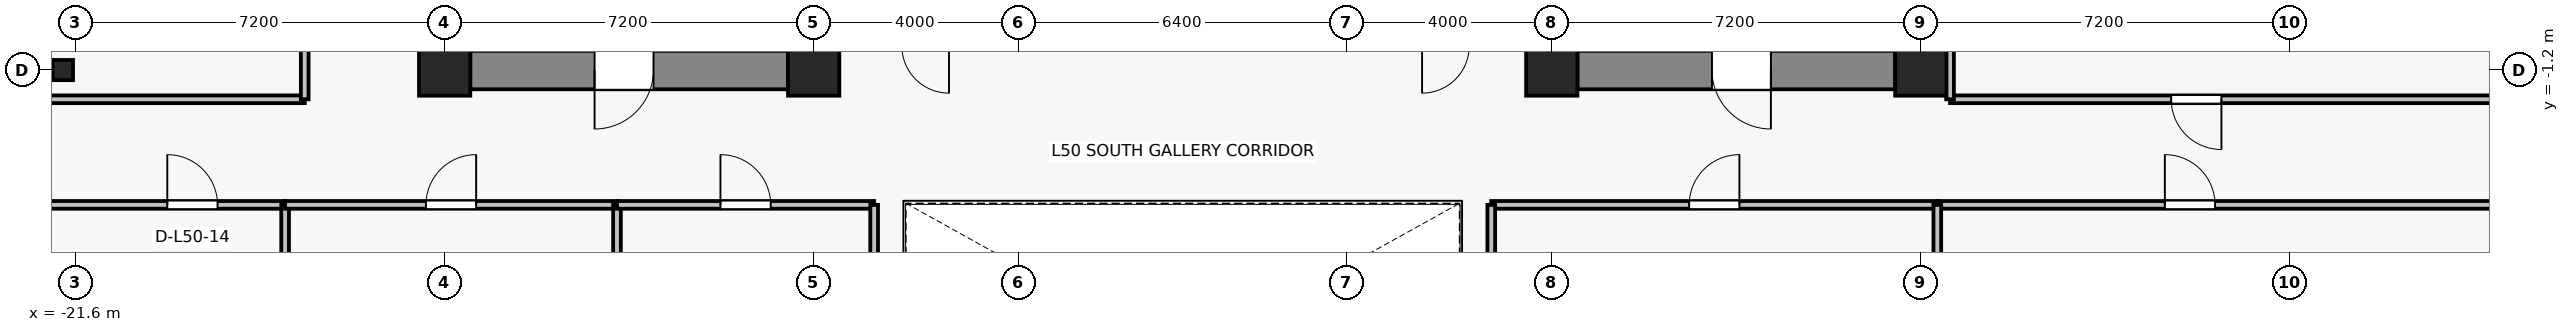
"""IFC4 building model, lengths in metres.
Left out: names, types, materials, properties, quantities, classifications, styles, units other than length and angle.
Written with IfcOpenShell. Run it as: python <this file> out.ifc"""

import sys

from ifc_helpers import new_model, si_unit, direction, frame, frame_2d, origin, origin_2d, place, context, subcontext, project, spatial, rectangle, i_section, extrude, source, transform, mapped, element, fill, save


model = new_model("IFC4")
c1 = context("Model", 3, precision=1e-05, world=origin(), true_north=direction((0.0, 1.0)))
c2 = subcontext(c1, "Body", "Model", "MODEL_VIEW")
j1 = project(units=[si_unit("LENGTHUNIT", "METRE"), si_unit("PLANEANGLEUNIT", "RADIAN")], contexts=[c1])
p1 = place(None, origin())
s1 = spatial("IfcSite", under=j1, at=p1, CompositionType="ELEMENT")
p2 = place(p1, origin())
s2 = spatial("IfcBuilding", under=s1, at=p2, CompositionType="ELEMENT")
p3 = place(p2, frame((0.0, 0.0, 179.2)))
s3 = spatial("IfcBuildingStorey", under=s2, at=p3, CompositionType="ELEMENT", Elevation=179.2)
for number, where, z_axis, x_axis in (
    (1, (-14.4, -1.2, 0.0), (0.0, 0.0, 1.0), (1.0, 0.0, 0.0)),
    (2, (-7.2, -1.2, 0.0), (0.0, 0.0, 1.0), (1.0, 0.0, 0.0)),
    (3, (7.2, -1.2, 0.0), (0.0, 0.0, 1.0), (1.0, 0.0, 0.0)),
    (4, (14.4, -1.2, 0.0), (0.0, 0.0, 1.0), (1.0, 0.0, 0.0)),
):
    element("IfcColumn", number, at=place(p3, frame(where, z_axis=z_axis, x_axis=x_axis)), inside=s3, PredefinedType="COLUMN", context=c2, shape_type="SweptSolid", body=[
        extrude(rectangle(XDim=1.0, YDim=1.0, at=origin_2d()), origin(), (0.0, 0.0, 1.0), 3.3),
    ])
p4 = place(p3, frame((-21.85, -1.2, 0.0), z_axis=(0.0, 0.0, 1.0), x_axis=(1.0, 0.0, 0.0)))
e5 = element("IfcColumn", 5, at=p4, inside=s3, PredefinedType="COLUMN", context=c2, shape_type="SweptSolid", body=[
    extrude(i_section(OverallWidth=0.399, OverallDepth=0.394, WebThickness=0.023, FlangeThickness=0.037, FilletRadius=0.015, at=origin_2d()), origin(), (0.0, 0.0, 1.0), 3.3),
])
p5 = place(p3, frame((-7.7, -1.2, 0.0), z_axis=(0.0, 0.0, 1.0), x_axis=(-1.0, 0.0, 0.0)))
e6 = element("IfcWall", 6, at=p5, inside=s3, PredefinedType="SHEAR", context=c2, shape_type="SweptSolid", body=[
    extrude(rectangle(XDim=6.2, YDim=0.75, at=frame_2d((3.1, 0.0))), origin(), (0.0, 0.0, 1.0), 3.075),
])
p6 = place(p5, frame((2.625, 0.0, 0.0)))
e7 = element("IfcOpeningElement", 7, at=p6, cuts=e6, PredefinedType="OPENING", context=c2, shape_type="SweptSolid", body=[
    extrude(rectangle(XDim=1.15, YDim=2.15, at=frame_2d((0.575, 1.075))), frame((0.0, 0.385, 0.0), z_axis=(0.0, -1.0, 0.0), x_axis=(1.0, 0.0, 0.0)), (0.0, 0.0, 1.0), 0.77),
])
p7 = place(p3, frame((13.9, -1.2, 0.0), z_axis=(0.0, 0.0, 1.0), x_axis=(-1.0, 0.0, 0.0)))
e8 = element("IfcWall", 8, at=p7, inside=s3, PredefinedType="SHEAR", context=c2, shape_type="SweptSolid", body=[
    extrude(rectangle(XDim=6.2, YDim=0.75, at=frame_2d((3.1, 0.0))), origin(), (0.0, 0.0, 1.0), 3.075),
])
p8 = place(p7, frame((2.425, 0.0, 0.0)))
e9 = element("IfcOpeningElement", 9, at=p8, cuts=e8, PredefinedType="OPENING", context=c2, shape_type="SweptSolid", body=[
    extrude(rectangle(XDim=1.15, YDim=2.15, at=frame_2d((0.575, 1.075))), frame((0.0, 0.385, 0.0), z_axis=(0.0, -1.0, 0.0), x_axis=(1.0, 0.0, 0.0)), (0.0, 0.0, 1.0), 0.77),
])
p9 = place(p3, frame((-22.53, -3.83, 0.0), z_axis=(0.0, 0.0, 1.0), x_axis=(1.0, 0.0, 0.0)))
e10 = element("IfcWall", 10, at=p9, inside=s3, PredefinedType="PARTITIONING", context=c2, shape_type="SweptSolid", body=[
    extrude(rectangle(XDim=5.018, YDim=0.15, at=frame_2d((2.509, 0.0))), origin(), (0.0, 0.0, 1.0), 2.565),
])
p10 = place(p9, frame((2.719, 0.0, 0.0)))
e11 = element("IfcOpeningElement", 11, at=p10, cuts=e10, PredefinedType="OPENING", context=c2, shape_type="SweptSolid", body=[
    extrude(rectangle(XDim=0.98, YDim=2.15, at=frame_2d((0.49, 1.075))), frame((0.0, 0.085, 0.0), z_axis=(0.0, -1.0, 0.0), x_axis=(1.0, 0.0, 0.0)), (0.0, 0.0, 1.0), 0.17),
])
p11 = place(p3, frame((-17.512, -3.83, 0.0), z_axis=(0.0, 0.0, 1.0), x_axis=(0.0, -1.0, 0.0)))
e12 = element("IfcWall", 12, at=p11, inside=s3, PredefinedType="PARTITIONING", context=c2, shape_type="SweptSolid", body=[
    extrude(rectangle(XDim=13.5, YDim=0.15, at=frame_2d((6.75, 0.0))), origin(), (0.0, 0.0, 1.0), 2.565),
])
p12 = place(p3, frame((-17.512, -3.83, 0.0), z_axis=(0.0, 0.0, 1.0), x_axis=(1.0, 0.0, 0.0)))
e13 = element("IfcWall", 13, at=p12, inside=s3, PredefinedType="PARTITIONING", context=c2, shape_type="SweptSolid", body=[
    extrude(rectangle(XDim=6.475, YDim=0.15, at=frame_2d((3.237, 0.0))), origin(), (0.0, 0.0, 1.0), 2.565),
])
p13 = place(p12, frame((2.747, 0.0, 0.0)))
e14 = element("IfcOpeningElement", 14, at=p13, cuts=e13, PredefinedType="OPENING", context=c2, shape_type="SweptSolid", body=[
    extrude(rectangle(XDim=0.98, YDim=2.15, at=frame_2d((0.49, 1.075))), frame((0.0, 0.085, 0.0), z_axis=(0.0, -1.0, 0.0), x_axis=(1.0, 0.0, 0.0)), (0.0, 0.0, 1.0), 0.17),
])
p14 = place(p3, frame((-11.038, -3.83, 0.0), z_axis=(0.0, 0.0, 1.0), x_axis=(0.0, -1.0, 0.0)))
e15 = element("IfcWall", 15, at=p14, inside=s3, PredefinedType="PARTITIONING", context=c2, shape_type="SweptSolid", body=[
    extrude(rectangle(XDim=13.5, YDim=0.15, at=frame_2d((6.75, 0.0))), origin(), (0.0, 0.0, 1.0), 2.565),
])
p15 = place(p3, frame((-11.038, -3.83, 0.0), z_axis=(0.0, 0.0, 1.0), x_axis=(1.0, 0.0, 0.0)))
e16 = element("IfcWall", 16, at=p15, inside=s3, PredefinedType="PARTITIONING", context=c2, shape_type="SweptSolid", body=[
    extrude(rectangle(XDim=5.018, YDim=0.15, at=frame_2d((2.509, 0.0))), origin(), (0.0, 0.0, 1.0), 2.565),
])
p16 = place(p15, frame((2.019, 0.0, 0.0)))
e17 = element("IfcOpeningElement", 17, at=p16, cuts=e16, PredefinedType="OPENING", context=c2, shape_type="SweptSolid", body=[
    extrude(rectangle(XDim=0.98, YDim=2.15, at=frame_2d((0.49, 1.075))), frame((0.0, 0.085, 0.0), z_axis=(0.0, -1.0, 0.0), x_axis=(1.0, 0.0, 0.0)), (0.0, 0.0, 1.0), 0.17),
])
p17 = place(p3, frame((-6.02, -3.83, 0.0), z_axis=(0.0, 0.0, 1.0), x_axis=(0.0, -1.0, 0.0)))
e18 = element("IfcWall", 18, at=p17, inside=s3, PredefinedType="PARTITIONING", context=c2, shape_type="SweptSolid", body=[
    extrude(rectangle(XDim=13.5, YDim=0.15, at=frame_2d((6.75, 0.0))), origin(), (0.0, 0.0, 1.0), 2.565),
])
p18 = place(p3, frame((6.02, -3.83, 0.0), z_axis=(0.0, 0.0, 1.0), x_axis=(1.0, 0.0, 0.0)))
e19 = element("IfcWall", 19, at=p18, inside=s3, PredefinedType="PARTITIONING", context=c2, shape_type="SweptSolid", body=[
    extrude(rectangle(XDim=8.702, YDim=0.15, at=frame_2d((4.351, 0.0))), origin(), (0.0, 0.0, 1.0), 2.565),
])
p19 = place(p18, frame((3.861, 0.0, 0.0)))
e20 = element("IfcOpeningElement", 20, at=p19, cuts=e19, PredefinedType="OPENING", context=c2, shape_type="SweptSolid", body=[
    extrude(rectangle(XDim=0.98, YDim=2.15, at=frame_2d((0.49, 1.075))), frame((0.0, 0.085, 0.0), z_axis=(0.0, -1.0, 0.0), x_axis=(1.0, 0.0, 0.0)), (0.0, 0.0, 1.0), 0.17),
])
p20 = place(p3, frame((6.02, -17.33, 0.0), z_axis=(0.0, 0.0, 1.0), x_axis=(0.0, 1.0, 0.0)))
e21 = element("IfcWall", 21, at=p20, inside=s3, PredefinedType="PARTITIONING", context=c2, shape_type="SweptSolid", body=[
    extrude(rectangle(XDim=13.5, YDim=0.15, at=frame_2d((6.75, 0.0))), origin(), (0.0, 0.0, 1.0), 2.565),
])
p21 = place(p3, frame((14.722, -3.83, 0.0), z_axis=(0.0, 0.0, 1.0), x_axis=(1.0, 0.0, 0.0)))
e22 = element("IfcWall", 22, at=p21, inside=s3, PredefinedType="PARTITIONING", context=c2, shape_type="SweptSolid", body=[
    extrude(rectangle(XDim=11.808, YDim=0.15, at=frame_2d((5.904, 0.0))), origin(), (0.0, 0.0, 1.0), 2.565),
])
p22 = place(p21, frame((4.439, 0.0, 0.0)))
e23 = element("IfcOpeningElement", 23, at=p22, cuts=e22, PredefinedType="OPENING", context=c2, shape_type="SweptSolid", body=[
    extrude(rectangle(XDim=0.98, YDim=2.15, at=frame_2d((0.49, 1.075))), frame((0.0, 0.085, 0.0), z_axis=(0.0, -1.0, 0.0), x_axis=(1.0, 0.0, 0.0)), (0.0, 0.0, 1.0), 0.17),
])
p23 = place(p3, frame((14.722, -9.18, 0.0), z_axis=(0.0, 0.0, 1.0), x_axis=(0.0, 1.0, 0.0)))
e24 = element("IfcWall", 24, at=p23, inside=s3, PredefinedType="PARTITIONING", context=c2, shape_type="SweptSolid", body=[
    extrude(rectangle(XDim=5.35, YDim=0.15, at=frame_2d((2.675, 0.0))), origin(), (0.0, 0.0, 1.0), 2.665),
])
p24 = place(p3, frame((-17.13, -1.77, 0.0), z_axis=(0.0, 0.0, 1.0), x_axis=(-1.0, 0.0, 0.0)))
e25 = element("IfcWall", 25, at=p24, inside=s3, PredefinedType="PARTITIONING", context=c2, shape_type="SweptSolid", body=[
    extrude(rectangle(XDim=5.4, YDim=0.15, at=frame_2d((2.7, 0.0))), origin(), (0.0, 0.0, 1.0), 2.565),
])
p25 = place(p3, frame((-17.13, 3.298, 0.0), z_axis=(0.0, 0.0, 1.0), x_axis=(0.0, -1.0, 0.0)))
e26 = element("IfcWall", 26, at=p25, inside=s3, PredefinedType="PARTITIONING", context=c2, shape_type="SweptSolid", body=[
    extrude(rectangle(XDim=5.068, YDim=0.15, at=frame_2d((2.534, 0.0))), origin(), (0.0, 0.0, 1.0), 2.565),
])
p26 = place(p25, frame((2.044, 0.0, 0.0)))
e27 = element("IfcOpeningElement", 27, at=p26, cuts=e26, PredefinedType="OPENING", context=c2, shape_type="SweptSolid", body=[
    extrude(rectangle(XDim=0.98, YDim=2.15, at=frame_2d((0.49, 1.075))), frame((0.0, 0.085, 0.0), z_axis=(0.0, -1.0, 0.0), x_axis=(1.0, 0.0, 0.0)), (0.0, 0.0, 1.0), 0.17),
])
p27 = place(p3, frame((26.53, -1.77, 0.0), z_axis=(0.0, 0.0, 1.0), x_axis=(-1.0, 0.0, 0.0)))
e28 = element("IfcWall", 28, at=p27, inside=s3, PredefinedType="PARTITIONING", context=c2, shape_type="SweptSolid", body=[
    extrude(rectangle(XDim=11.56, YDim=0.15, at=frame_2d((5.78, 0.0))), origin(), (0.0, 0.0, 1.0), 2.565),
])
p28 = place(p27, frame((6.265, 0.0, 0.0)))
e29 = element("IfcOpeningElement", 29, at=p28, cuts=e28, PredefinedType="OPENING", context=c2, shape_type="SweptSolid", body=[
    extrude(rectangle(XDim=0.98, YDim=2.15, at=frame_2d((0.49, 1.075))), frame((0.0, 0.085, 0.0), z_axis=(0.0, -1.0, 0.0), x_axis=(1.0, 0.0, 0.0)), (0.0, 0.0, 1.0), 0.17),
])
p29 = place(p3, frame((14.97, -1.77, 0.0), z_axis=(0.0, 0.0, 1.0), x_axis=(0.0, 1.0, 0.0)))
e30 = element("IfcWall", 30, at=p29, inside=s3, PredefinedType="PARTITIONING", context=c2, shape_type="SweptSolid", body=[
    extrude(rectangle(XDim=1.07, YDim=0.15, at=frame_2d((0.535, 0.0))), origin(), (0.0, 0.0, 1.0), 2.565),
])
m1 = source(origin(), c2, "Body", "SweptSolid", [
    extrude(rectangle(XDim=1.15, YDim=2.15, at=frame_2d((0.575, 1.075))), frame((0.0, 0.025, 0.0), z_axis=(0.0, -1.0, 0.0), x_axis=(1.0, 0.0, 0.0)), (0.0, 0.0, 1.0), 0.05),
])
p30 = place(p6, origin())
e31 = element("IfcDoor", 31, at=p30, inside=s3, OperationType="SINGLE_SWING_RIGHT", PredefinedType="DOOR", context=c2, shape_type="MappedRepresentation", body=[
    mapped(m1, transform((0.0, 0.0, 0.0), x_axis=(1.0, 0.0, 0.0), y_axis=(0.0, 1.0, 0.0), z_axis=(0.0, 0.0, 1.0), scale=1.0)),
])
fill(e7, e31)
p31 = place(p8, origin())
e32 = element("IfcDoor", 32, at=p31, inside=s3, OperationType="SINGLE_SWING_LEFT", PredefinedType="DOOR", context=c2, shape_type="MappedRepresentation", body=[
    mapped(m1, transform((0.0, 0.0, 0.0), x_axis=(1.0, 0.0, 0.0), y_axis=(0.0, 1.0, 0.0), z_axis=(0.0, 0.0, 1.0), scale=1.0)),
])
fill(e9, e32)
m2 = source(origin(), c2, "Body", "SweptSolid", [
    extrude(rectangle(XDim=0.98, YDim=2.15, at=frame_2d((0.49, 1.075))), frame((0.0, 0.025, 0.0), z_axis=(0.0, -1.0, 0.0), x_axis=(1.0, 0.0, 0.0)), (0.0, 0.0, 1.0), 0.05),
])
p32 = place(p10, origin())
e33 = element("IfcDoor", 33, at=p32, inside=s3, OperationType="SINGLE_SWING_LEFT", PredefinedType="DOOR", context=c2, shape_type="MappedRepresentation", body=[
    mapped(m2, transform((0.0, 0.0, 0.0), x_axis=(1.0, 0.0, 0.0), y_axis=(0.0, 1.0, 0.0), z_axis=(0.0, 0.0, 1.0), scale=1.0)),
])
fill(e11, e33)
p33 = place(p13, origin())
e34 = element("IfcDoor", 34, at=p33, inside=s3, OperationType="SINGLE_SWING_RIGHT", PredefinedType="DOOR", context=c2, shape_type="MappedRepresentation", body=[
    mapped(m2, transform((0.0, 0.0, 0.0), x_axis=(1.0, 0.0, 0.0), y_axis=(0.0, 1.0, 0.0), z_axis=(0.0, 0.0, 1.0), scale=1.0)),
])
fill(e14, e34)
p34 = place(p16, origin())
e35 = element("IfcDoor", 35, at=p34, inside=s3, OperationType="SINGLE_SWING_LEFT", PredefinedType="DOOR", context=c2, shape_type="MappedRepresentation", body=[
    mapped(m2, transform((0.0, 0.0, 0.0), x_axis=(1.0, 0.0, 0.0), y_axis=(0.0, 1.0, 0.0), z_axis=(0.0, 0.0, 1.0), scale=1.0)),
])
fill(e17, e35)
p35 = place(p19, origin())
e36 = element("IfcDoor", 36, at=p35, inside=s3, OperationType="SINGLE_SWING_RIGHT", PredefinedType="DOOR", context=c2, shape_type="MappedRepresentation", body=[
    mapped(m2, transform((0.0, 0.0, 0.0), x_axis=(1.0, 0.0, 0.0), y_axis=(0.0, 1.0, 0.0), z_axis=(0.0, 0.0, 1.0), scale=1.0)),
])
fill(e20, e36)
p36 = place(p22, origin())
e37 = element("IfcDoor", 37, at=p36, inside=s3, OperationType="SINGLE_SWING_LEFT", PredefinedType="DOOR", context=c2, shape_type="MappedRepresentation", body=[
    mapped(m2, transform((0.0, 0.0, 0.0), x_axis=(1.0, 0.0, 0.0), y_axis=(0.0, 1.0, 0.0), z_axis=(0.0, 0.0, 1.0), scale=1.0)),
])
fill(e23, e37)
p37 = place(p28, origin())
e38 = element("IfcDoor", 38, at=p37, inside=s3, OperationType="SINGLE_SWING_LEFT", PredefinedType="DOOR", context=c2, shape_type="MappedRepresentation", body=[
    mapped(m2, transform((0.0, 0.0, 0.0), x_axis=(1.0, 0.0, 0.0), y_axis=(0.0, 1.0, 0.0), z_axis=(0.0, 0.0, 1.0), scale=1.0)),
])
fill(e29, e38)
save(model, sys.argv[1])
